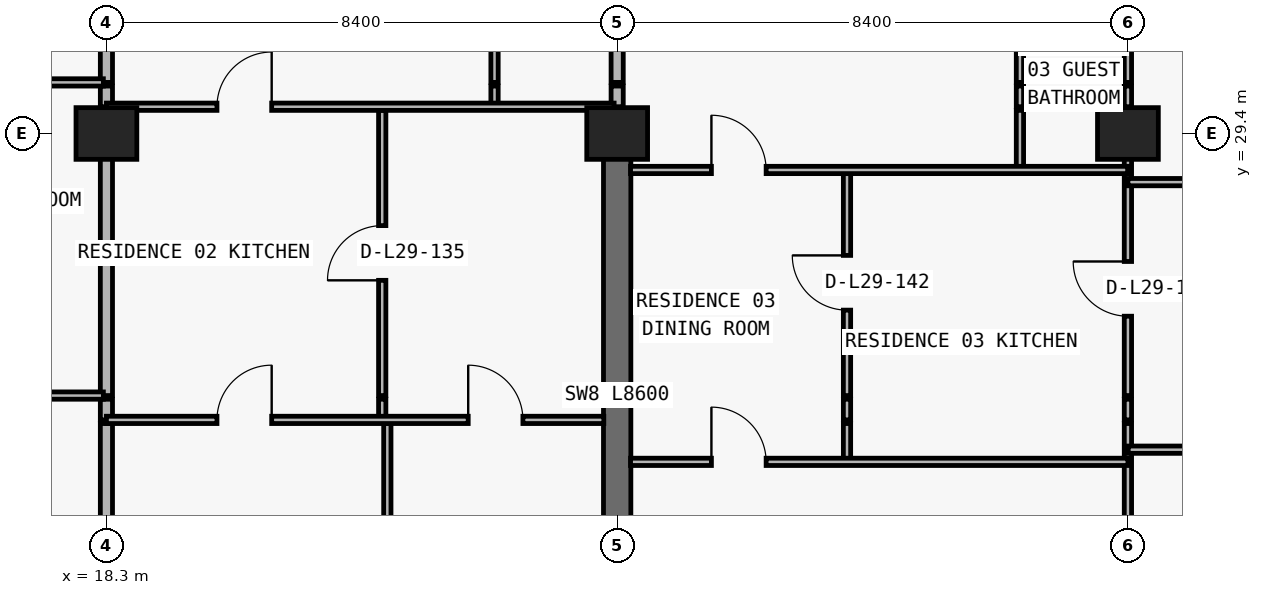
"""IFC4 building model, lengths in metres.
Left out: names, types, materials, properties, quantities, classifications, styles, units other than length and angle.
Written with IfcOpenShell. Run it as: python <this file> out.ifc"""

import sys

from ifc_helpers import new_model, si_unit, direction, frame, frame_2d, origin, origin_2d, place, context, subcontext, project, spatial, rectangle, extrude, element, fill, save


model = new_model("IFC4")
c1 = context("Model", 3, precision=1e-05, world=origin(), true_north=direction((0.0, 1.0)))
c2 = subcontext(c1, "Body", "Model", "MODEL_VIEW")
j1 = project(units=[si_unit("LENGTHUNIT", "METRE"), si_unit("PLANEANGLEUNIT", "RADIAN")], contexts=[c1])
p1 = place(None, origin())
s1 = spatial("IfcSite", under=j1, at=p1, CompositionType="ELEMENT")
p2 = place(p1, origin())
s2 = spatial("IfcBuilding", under=s1, at=p2, CompositionType="ELEMENT")
p3 = place(p2, frame((0.0, 0.0, 109.2)))
s3 = spatial("IfcBuildingStorey", under=s2, at=p3, CompositionType="ELEMENT", Elevation=109.2)
for number, where, z_axis, x_axis in (
    (1, (18.3, 29.4, 0.0), (0.0, 0.0, 1.0), (1.0, 0.0, 0.0)),
    (2, (26.7, 29.4, 0.0), (0.0, 0.0, 1.0), (1.0, 0.0, 0.0)),
    (3, (35.1, 29.4, 0.0), (0.0, 0.0, 1.0), (1.0, 0.0, 0.0)),
):
    element("IfcColumn", number, at=place(p3, frame(where, z_axis=z_axis, x_axis=x_axis)), inside=s3, PredefinedType="COLUMN", context=c2, shape_type="SweptSolid", body=[
        extrude(rectangle(XDim=1.0, YDim=0.85, at=origin_2d()), origin(), (0.0, 0.0, 1.0), 3.05),
    ])
p4 = place(p3, frame((26.7, 20.8, 0.0), z_axis=(0.0, 0.0, 1.0), x_axis=(0.0, 1.0, 0.0)))
e4 = element("IfcWall", 4, at=p4, inside=s3, PredefinedType="SHEAR", context=c2, shape_type="SweptSolid", body=[
    extrude(rectangle(XDim=8.6, YDim=0.45, at=frame_2d((4.3, 0.0))), origin(), (0.0, 0.0, 1.0), 3.05),
])
p5 = place(p3, frame((18.3, 8.84, 0.0), z_axis=(0.0, 0.0, 1.0), x_axis=(0.0, 1.0, 0.0)))
e5 = element("IfcWall", 5, at=p5, inside=s3, PredefinedType="PARTITIONING", context=c2, shape_type="SweptSolid", body=[
    extrude(rectangle(XDim=15.79, YDim=0.2, at=frame_2d((7.895, 0.0))), origin(), (0.0, 0.0, 1.0), 2.174),
])
p6 = place(p3, frame((18.3, 24.69, 0.0), z_axis=(0.0, 0.0, 1.0), x_axis=(0.0, 1.0, 0.0)))
e6 = element("IfcWall", 6, at=p6, inside=s3, PredefinedType="PARTITIONING", context=c2, shape_type="SweptSolid", body=[
    extrude(rectangle(XDim=0.34, YDim=0.2, at=frame_2d((0.17, 0.0))), origin(), (0.0, 0.0, 1.0), 2.174),
])
p7 = place(p3, frame((18.3, 25.09, 0.0), z_axis=(0.0, 0.0, 1.0), x_axis=(0.0, 1.0, 0.0)))
e7 = element("IfcWall", 7, at=p7, inside=s3, PredefinedType="PARTITIONING", context=c2, shape_type="SweptSolid", body=[
    extrude(rectangle(XDim=4.69, YDim=0.2, at=frame_2d((2.345, 0.0))), origin(), (0.0, 0.0, 1.0), 2.174),
])
p8 = place(p3, frame((18.3, 29.84, 0.0), z_axis=(0.0, 0.0, 1.0), x_axis=(0.0, 1.0, 0.0)))
e8 = element("IfcWall", 8, at=p8, inside=s3, PredefinedType="PARTITIONING", context=c2, shape_type="SweptSolid", body=[
    extrude(rectangle(XDim=0.34, YDim=0.2, at=frame_2d((0.17, 0.0))), origin(), (0.0, 0.0, 1.0), 2.174),
])
p9 = place(p3, frame((18.3, 30.24, 0.0), z_axis=(0.0, 0.0, 1.0), x_axis=(0.0, 1.0, 0.0)))
e9 = element("IfcWall", 9, at=p9, inside=s3, PredefinedType="PARTITIONING", context=c2, shape_type="SweptSolid", body=[
    extrude(rectangle(XDim=4.36, YDim=0.2, at=frame_2d((2.18, 0.0))), origin(), (0.0, 0.0, 1.0), 2.174),
])
p10 = place(p3, frame((22.836, 24.69, 0.0), z_axis=(0.0, 0.0, 1.0), x_axis=(0.0, 1.0, 0.0)))
e10 = element("IfcWall", 10, at=p10, inside=s3, PredefinedType="PARTITIONING", context=c2, shape_type="SweptSolid", body=[
    extrude(rectangle(XDim=0.34, YDim=0.12, at=frame_2d((0.17, 0.0))), origin(), (0.0, 0.0, 1.0), 3.05),
])
p11 = place(p3, frame((22.836, 25.09, 0.0), z_axis=(0.0, 0.0, 1.0), x_axis=(0.0, 1.0, 0.0)))
e11 = element("IfcWall", 11, at=p11, inside=s3, PredefinedType="PARTITIONING", context=c2, shape_type="SweptSolid", body=[
    extrude(rectangle(XDim=4.69, YDim=0.12, at=frame_2d((2.345, 0.0))), origin(), (0.0, 0.0, 1.0), 3.05),
])
p12 = place(p11, frame((1.895, 0.0, 0.0)))
e12 = element("IfcOpeningElement", 12, at=p12, cuts=e11, PredefinedType="OPENING", context=c2, shape_type="SweptSolid", body=[
    extrude(rectangle(XDim=0.9, YDim=2.15, at=frame_2d((0.45, 1.075))), frame((0.0, 0.07, 0.0), z_axis=(0.0, -1.0, 0.0), x_axis=(1.0, 0.0, 0.0)), (0.0, 0.0, 1.0), 0.14),
])
p13 = place(p3, frame((22.92, 8.84, 0.0), z_axis=(0.0, 0.0, 1.0), x_axis=(0.0, 1.0, 0.0)))
e13 = element("IfcWall", 13, at=p13, inside=s3, PredefinedType="PARTITIONING", context=c2, shape_type="SweptSolid", body=[
    extrude(rectangle(XDim=15.79, YDim=0.12, at=frame_2d((7.895, 0.0))), origin(), (0.0, 0.0, 1.0), 3.05),
])
p14 = place(p3, frame((24.683, 29.84, 0.0), z_axis=(0.0, 0.0, 1.0), x_axis=(0.0, 1.0, 0.0)))
e14 = element("IfcWall", 14, at=p14, inside=s3, PredefinedType="PARTITIONING", context=c2, shape_type="SweptSolid", body=[
    extrude(rectangle(XDim=0.34, YDim=0.12, at=frame_2d((0.17, 0.0))), origin(), (0.0, 0.0, 1.0), 3.05),
])
p15 = place(p3, frame((24.683, 30.24, 0.0), z_axis=(0.0, 0.0, 1.0), x_axis=(0.0, 1.0, 0.0)))
e15 = element("IfcWall", 15, at=p15, inside=s3, PredefinedType="PARTITIONING", context=c2, shape_type="SweptSolid", body=[
    extrude(rectangle(XDim=4.36, YDim=0.12, at=frame_2d((2.18, 0.0))), origin(), (0.0, 0.0, 1.0), 3.05),
])
p16 = place(p15, frame((1.755, 0.0, 0.0)))
e16 = element("IfcOpeningElement", 16, at=p16, cuts=e15, PredefinedType="OPENING", context=c2, shape_type="SweptSolid", body=[
    extrude(rectangle(XDim=0.85, YDim=2.1, at=frame_2d((0.425, 1.05))), frame((0.0, 0.07, 0.0), z_axis=(0.0, -1.0, 0.0), x_axis=(1.0, 0.0, 0.0)), (0.0, 0.0, 1.0), 0.14),
])
p17 = place(p3, frame((26.7, 29.405, 0.0), z_axis=(0.0, 0.0, 1.0), x_axis=(0.0, 1.0, 0.0)))
e17 = element("IfcWall", 17, at=p17, inside=s3, PredefinedType="PARTITIONING", context=c2, shape_type="SweptSolid", body=[
    extrude(rectangle(XDim=0.375, YDim=0.2, at=frame_2d((0.188, 0.0))), origin(), (0.0, 0.0, 1.0), 3.05),
])
p18 = place(p3, frame((26.7, 29.84, 0.0), z_axis=(0.0, 0.0, 1.0), x_axis=(0.0, 1.0, 0.0)))
e18 = element("IfcWall", 18, at=p18, inside=s3, PredefinedType="PARTITIONING", context=c2, shape_type="SweptSolid", body=[
    extrude(rectangle(XDim=0.34, YDim=0.2, at=frame_2d((0.17, 0.0))), origin(), (0.0, 0.0, 1.0), 2.335),
])
p19 = place(p3, frame((26.7, 30.24, 0.0), z_axis=(0.0, 0.0, 1.0), x_axis=(0.0, 1.0, 0.0)))
e19 = element("IfcWall", 19, at=p19, inside=s3, PredefinedType="PARTITIONING", context=c2, shape_type="SweptSolid", body=[
    extrude(rectangle(XDim=4.36, YDim=0.2, at=frame_2d((2.18, 0.0))), origin(), (0.0, 0.0, 1.0), 2.335),
])
p20 = place(p3, frame((30.48, 24.0, 0.0), z_axis=(0.0, 0.0, 1.0), x_axis=(0.0, 1.0, 0.0)))
e20 = element("IfcWall", 20, at=p20, inside=s3, PredefinedType="PARTITIONING", context=c2, shape_type="SweptSolid", body=[
    extrude(rectangle(XDim=0.63, YDim=0.12, at=frame_2d((0.315, 0.0))), origin(), (0.0, 0.0, 1.0), 3.05),
])
p21 = place(p3, frame((30.48, 24.69, 0.0), z_axis=(0.0, 0.0, 1.0), x_axis=(0.0, 1.0, 0.0)))
e21 = element("IfcWall", 21, at=p21, inside=s3, PredefinedType="PARTITIONING", context=c2, shape_type="SweptSolid", body=[
    extrude(rectangle(XDim=0.34, YDim=0.12, at=frame_2d((0.17, 0.0))), origin(), (0.0, 0.0, 1.0), 3.05),
])
p22 = place(p3, frame((30.48, 25.09, 0.0), z_axis=(0.0, 0.0, 1.0), x_axis=(0.0, 1.0, 0.0)))
e22 = element("IfcWall", 22, at=p22, inside=s3, PredefinedType="PARTITIONING", context=c2, shape_type="SweptSolid", body=[
    extrude(rectangle(XDim=3.71, YDim=0.12, at=frame_2d((1.855, 0.0))), origin(), (0.0, 0.0, 1.0), 3.05),
])
p23 = place(p22, frame((1.405, 0.0, 0.0)))
e23 = element("IfcOpeningElement", 23, at=p23, cuts=e22, PredefinedType="OPENING", context=c2, shape_type="SweptSolid", body=[
    extrude(rectangle(XDim=0.9, YDim=2.15, at=frame_2d((0.45, 1.075))), frame((0.0, 0.07, 0.0), z_axis=(0.0, -1.0, 0.0), x_axis=(1.0, 0.0, 0.0)), (0.0, 0.0, 1.0), 0.14),
])
p24 = place(p3, frame((33.324, 28.8, 0.0), z_axis=(0.0, 0.0, 1.0), x_axis=(0.0, 1.0, 0.0)))
e24 = element("IfcWall", 24, at=p24, inside=s3, PredefinedType="PARTITIONING", context=c2, shape_type="SweptSolid", body=[
    extrude(rectangle(XDim=0.98, YDim=0.12, at=frame_2d((0.49, 0.0))), origin(), (0.0, 0.0, 1.0), 3.05),
])
p25 = place(p3, frame((33.324, 29.84, 0.0), z_axis=(0.0, 0.0, 1.0), x_axis=(0.0, 1.0, 0.0)))
e25 = element("IfcWall", 25, at=p25, inside=s3, PredefinedType="PARTITIONING", context=c2, shape_type="SweptSolid", body=[
    extrude(rectangle(XDim=0.34, YDim=0.12, at=frame_2d((0.17, 0.0))), origin(), (0.0, 0.0, 1.0), 3.05),
])
p26 = place(p3, frame((33.324, 30.24, 0.0), z_axis=(0.0, 0.0, 1.0), x_axis=(0.0, 1.0, 0.0)))
e26 = element("IfcWall", 26, at=p26, inside=s3, PredefinedType="PARTITIONING", context=c2, shape_type="SweptSolid", body=[
    extrude(rectangle(XDim=4.36, YDim=0.12, at=frame_2d((2.18, 0.0))), origin(), (0.0, 0.0, 1.0), 3.05),
])
p27 = place(p26, frame((1.755, 0.0, 0.0)))
e27 = element("IfcOpeningElement", 27, at=p27, cuts=e26, PredefinedType="OPENING", context=c2, shape_type="SweptSolid", body=[
    extrude(rectangle(XDim=0.85, YDim=2.1, at=frame_2d((0.425, 1.05))), frame((0.0, 0.07, 0.0), z_axis=(0.0, -1.0, 0.0), x_axis=(1.0, 0.0, 0.0)), (0.0, 0.0, 1.0), 0.14),
])
p28 = place(p3, frame((35.1, 8.84, 0.0), z_axis=(0.0, 0.0, 1.0), x_axis=(0.0, 1.0, 0.0)))
e28 = element("IfcWall", 28, at=p28, inside=s3, PredefinedType="PARTITIONING", context=c2, shape_type="SweptSolid", body=[
    extrude(rectangle(XDim=15.79, YDim=0.12, at=frame_2d((7.895, 0.0))), origin(), (0.0, 0.0, 1.0), 2.174),
])
p29 = place(p3, frame((35.1, 24.69, 0.0), z_axis=(0.0, 0.0, 1.0), x_axis=(0.0, 1.0, 0.0)))
e29 = element("IfcWall", 29, at=p29, inside=s3, PredefinedType="PARTITIONING", context=c2, shape_type="SweptSolid", body=[
    extrude(rectangle(XDim=0.34, YDim=0.12, at=frame_2d((0.17, 0.0))), origin(), (0.0, 0.0, 1.0), 2.174),
])
p30 = place(p3, frame((35.1, 25.09, 0.0), z_axis=(0.0, 0.0, 1.0), x_axis=(0.0, 1.0, 0.0)))
e30 = element("IfcWall", 30, at=p30, inside=s3, PredefinedType="PARTITIONING", context=c2, shape_type="SweptSolid", body=[
    extrude(rectangle(XDim=4.69, YDim=0.12, at=frame_2d((2.345, 0.0))), origin(), (0.0, 0.0, 1.0), 2.174),
])
p31 = place(p30, frame((1.305, 0.0, 0.0)))
e31 = element("IfcOpeningElement", 31, at=p31, cuts=e30, PredefinedType="OPENING", context=c2, shape_type="SweptSolid", body=[
    extrude(rectangle(XDim=0.9, YDim=2.124, at=frame_2d((0.45, 1.062))), frame((0.0, 0.07, 0.0), z_axis=(0.0, -1.0, 0.0), x_axis=(1.0, 0.0, 0.0)), (0.0, 0.0, 1.0), 0.14),
])
p32 = place(p3, frame((35.1, 29.84, 0.0), z_axis=(0.0, 0.0, 1.0), x_axis=(0.0, 1.0, 0.0)))
e32 = element("IfcWall", 32, at=p32, inside=s3, PredefinedType="PARTITIONING", context=c2, shape_type="SweptSolid", body=[
    extrude(rectangle(XDim=0.34, YDim=0.12, at=frame_2d((0.17, 0.0))), origin(), (0.0, 0.0, 1.0), 2.174),
])
p33 = place(p3, frame((35.1, 30.24, 0.0), z_axis=(0.0, 0.0, 1.0), x_axis=(0.0, 1.0, 0.0)))
e33 = element("IfcWall", 33, at=p33, inside=s3, PredefinedType="PARTITIONING", context=c2, shape_type="SweptSolid", body=[
    extrude(rectangle(XDim=4.36, YDim=0.12, at=frame_2d((2.18, 0.0))), origin(), (0.0, 0.0, 1.0), 2.174),
])
p34 = place(p3, frame((26.92, 24.0, 0.0), z_axis=(0.0, 0.0, 1.0), x_axis=(1.0, 0.0, 0.0)))
e34 = element("IfcWall", 34, at=p34, inside=s3, PredefinedType="PARTITIONING", context=c2, shape_type="SweptSolid", body=[
    extrude(rectangle(XDim=8.18, YDim=0.12, at=frame_2d((4.09, 0.0))), origin(), (0.0, 0.0, 1.0), 3.05),
])
p35 = place(p34, frame((1.33, 0.0, 0.0)))
e35 = element("IfcOpeningElement", 35, at=p35, cuts=e34, PredefinedType="OPENING", context=c2, shape_type="SweptSolid", body=[
    extrude(rectangle(XDim=0.9, YDim=2.15, at=frame_2d((0.45, 1.075))), frame((0.0, 0.07, 0.0), z_axis=(0.0, -1.0, 0.0), x_axis=(1.0, 0.0, 0.0)), (0.0, 0.0, 1.0), 0.14),
])
p36 = place(p3, frame((35.105, 24.2, 0.0), z_axis=(0.0, 0.0, 1.0), x_axis=(1.0, 0.0, 0.0)))
e36 = element("IfcWall", 36, at=p36, inside=s3, PredefinedType="PARTITIONING", context=c2, shape_type="SweptSolid", body=[
    extrude(rectangle(XDim=7.59, YDim=0.12, at=frame_2d((3.795, 0.0))), origin(), (0.0, 0.0, 1.0), 3.05),
])
p37 = place(p36, frame((3.345, 0.0, 0.0)))
e37 = element("IfcOpeningElement", 37, at=p37, cuts=e36, PredefinedType="OPENING", context=c2, shape_type="SweptSolid", body=[
    extrude(rectangle(XDim=0.9, YDim=2.15, at=frame_2d((0.45, 1.075))), frame((0.0, 0.07, 0.0), z_axis=(0.0, -1.0, 0.0), x_axis=(1.0, 0.0, 0.0)), (0.0, 0.0, 1.0), 0.14),
])
p38 = place(p3, frame((18.3, 24.69, 0.0), z_axis=(0.0, 0.0, 1.0), x_axis=(1.0, 0.0, 0.0)))
e38 = element("IfcWall", 38, at=p38, inside=s3, PredefinedType="PARTITIONING", context=c2, shape_type="SweptSolid", body=[
    extrude(rectangle(XDim=8.18, YDim=0.12, at=frame_2d((4.09, 0.0))), origin(), (0.0, 0.0, 1.0), 3.05),
])
p39 = place(p38, frame((1.818, 0.0, 0.0)))
e39 = element("IfcOpeningElement", 39, at=p39, cuts=e38, PredefinedType="OPENING", context=c2, shape_type="SweptSolid", body=[
    extrude(rectangle(XDim=0.9, YDim=2.15, at=frame_2d((0.45, 1.075))), frame((0.0, 0.07, 0.0), z_axis=(0.0, -1.0, 0.0), x_axis=(1.0, 0.0, 0.0)), (0.0, 0.0, 1.0), 0.14),
])
p40 = place(p38, frame((5.95, 0.0, 0.0)))
e40 = element("IfcOpeningElement", 40, at=p40, cuts=e38, PredefinedType="OPENING", context=c2, shape_type="SweptSolid", body=[
    extrude(rectangle(XDim=0.9, YDim=2.15, at=frame_2d((0.45, 1.075))), frame((0.0, 0.07, 0.0), z_axis=(0.0, -1.0, 0.0), x_axis=(1.0, 0.0, 0.0)), (0.0, 0.0, 1.0), 0.14),
])
p41 = place(p3, frame((9.9, 25.09, 0.0), z_axis=(0.0, 0.0, 1.0), x_axis=(1.0, 0.0, 0.0)))
e41 = element("IfcWall", 41, at=p41, inside=s3, PredefinedType="PARTITIONING", context=c2, shape_type="SweptSolid", body=[
    extrude(rectangle(XDim=8.35, YDim=0.12, at=frame_2d((4.175, 0.0))), origin(), (0.0, 0.0, 1.0), 3.05),
])
p42 = place(p41, frame((1.524, 0.0, 0.0)))
e42 = element("IfcOpeningElement", 42, at=p42, cuts=e41, PredefinedType="OPENING", context=c2, shape_type="SweptSolid", body=[
    extrude(rectangle(XDim=0.9, YDim=2.15, at=frame_2d((0.45, 1.075))), frame((0.0, 0.07, 0.0), z_axis=(0.0, -1.0, 0.0), x_axis=(1.0, 0.0, 0.0)), (0.0, 0.0, 1.0), 0.14),
])
p43 = place(p41, frame((5.868, 0.0, 0.0)))
e43 = element("IfcOpeningElement", 43, at=p43, cuts=e41, PredefinedType="OPENING", context=c2, shape_type="SweptSolid", body=[
    extrude(rectangle(XDim=0.9, YDim=2.15, at=frame_2d((0.45, 1.075))), frame((0.0, 0.07, 0.0), z_axis=(0.0, -1.0, 0.0), x_axis=(1.0, 0.0, 0.0)), (0.0, 0.0, 1.0), 0.14),
])
p44 = place(p3, frame((35.1, 28.6, 0.0), z_axis=(0.0, 0.0, 1.0), x_axis=(1.0, 0.0, 0.0)))
e44 = element("IfcWall", 44, at=p44, inside=s3, PredefinedType="PARTITIONING", context=c2, shape_type="SweptSolid", body=[
    extrude(rectangle(XDim=7.6, YDim=0.12, at=frame_2d((3.8, 0.0))), origin(), (0.0, 0.0, 1.0), 3.05),
])
p45 = place(p44, frame((2.55, 0.0, 0.0)))
e45 = element("IfcOpeningElement", 45, at=p45, cuts=e44, PredefinedType="OPENING", context=c2, shape_type="SweptSolid", body=[
    extrude(rectangle(XDim=0.9, YDim=2.15, at=frame_2d((0.45, 1.075))), frame((0.0, 0.07, 0.0), z_axis=(0.0, -1.0, 0.0), x_axis=(1.0, 0.0, 0.0)), (0.0, 0.0, 1.0), 0.14),
])
p46 = place(p3, frame((26.92, 28.8, 0.0), z_axis=(0.0, 0.0, 1.0), x_axis=(1.0, 0.0, 0.0)))
e46 = element("IfcWall", 46, at=p46, inside=s3, PredefinedType="PARTITIONING", context=c2, shape_type="SweptSolid", body=[
    extrude(rectangle(XDim=8.175, YDim=0.12, at=frame_2d((4.087, 0.0))), origin(), (0.0, 0.0, 1.0), 3.05),
])
p47 = place(p46, frame((1.33, 0.0, 0.0)))
e47 = element("IfcOpeningElement", 47, at=p47, cuts=e46, PredefinedType="OPENING", context=c2, shape_type="SweptSolid", body=[
    extrude(rectangle(XDim=0.9, YDim=2.15, at=frame_2d((0.45, 1.075))), frame((0.0, 0.07, 0.0), z_axis=(0.0, -1.0, 0.0), x_axis=(1.0, 0.0, 0.0)), (0.0, 0.0, 1.0), 0.14),
])
p48 = place(p3, frame((18.3, 29.84, 0.0), z_axis=(0.0, 0.0, 1.0), x_axis=(1.0, 0.0, 0.0)))
e48 = element("IfcWall", 48, at=p48, inside=s3, PredefinedType="PARTITIONING", context=c2, shape_type="SweptSolid", body=[
    extrude(rectangle(XDim=8.35, YDim=0.12, at=frame_2d((4.175, 0.0))), origin(), (0.0, 0.0, 1.0), 3.05),
])
p49 = place(p48, frame((1.818, 0.0, 0.0)))
e49 = element("IfcOpeningElement", 49, at=p49, cuts=e48, PredefinedType="OPENING", context=c2, shape_type="SweptSolid", body=[
    extrude(rectangle(XDim=0.9, YDim=2.15, at=frame_2d((0.45, 1.075))), frame((0.0, 0.07, 0.0), z_axis=(0.0, -1.0, 0.0), x_axis=(1.0, 0.0, 0.0)), (0.0, 0.0, 1.0), 0.14),
])
p50 = place(p3, frame((9.9, 30.24, 0.0), z_axis=(0.0, 0.0, 1.0), x_axis=(1.0, 0.0, 0.0)))
e50 = element("IfcWall", 50, at=p50, inside=s3, PredefinedType="PARTITIONING", context=c2, shape_type="SweptSolid", body=[
    extrude(rectangle(XDim=8.35, YDim=0.12, at=frame_2d((4.175, 0.0))), origin(), (0.0, 0.0, 1.0), 3.05),
])
p51 = place(p50, frame((1.693, 0.0, 0.0)))
e51 = element("IfcOpeningElement", 51, at=p51, cuts=e50, PredefinedType="OPENING", context=c2, shape_type="SweptSolid", body=[
    extrude(rectangle(XDim=0.9, YDim=2.15, at=frame_2d((0.45, 1.075))), frame((0.0, 0.07, 0.0), z_axis=(0.0, -1.0, 0.0), x_axis=(1.0, 0.0, 0.0)), (0.0, 0.0, 1.0), 0.14),
])
p52 = place(p49, origin())
e52 = element("IfcDoor", 52, at=p52, inside=s3, OperationType="SINGLE_SWING_RIGHT", PredefinedType="DOOR", context=c2, shape_type="SweptSolid", body=[
    extrude(rectangle(XDim=0.9, YDim=2.15, at=frame_2d((0.45, 1.075))), frame((0.0, 0.025, 0.0), z_axis=(0.0, -1.0, 0.0), x_axis=(1.0, 0.0, 0.0)), (0.0, 0.0, 1.0), 0.05),
])
fill(e49, e52)
p53 = place(p12, origin())
e53 = element("IfcDoor", 53, at=p53, inside=s3, OperationType="SINGLE_SWING_LEFT", PredefinedType="DOOR", context=c2, shape_type="SweptSolid", body=[
    extrude(rectangle(XDim=0.9, YDim=2.15, at=frame_2d((0.45, 1.075))), frame((0.0, 0.025, 0.0), z_axis=(0.0, -1.0, 0.0), x_axis=(1.0, 0.0, 0.0)), (0.0, 0.0, 1.0), 0.05),
])
fill(e12, e53)
p54 = place(p39, origin())
e54 = element("IfcDoor", 54, at=p54, inside=s3, OperationType="SINGLE_SWING_RIGHT", PredefinedType="DOOR", context=c2, shape_type="SweptSolid", body=[
    extrude(rectangle(XDim=0.9, YDim=2.15, at=frame_2d((0.45, 1.075))), frame((0.0, 0.025, 0.0), z_axis=(0.0, -1.0, 0.0), x_axis=(1.0, 0.0, 0.0)), (0.0, 0.0, 1.0), 0.05),
])
fill(e39, e54)
p55 = place(p40, origin())
e55 = element("IfcDoor", 55, at=p55, inside=s3, OperationType="SINGLE_SWING_LEFT", PredefinedType="DOOR", context=c2, shape_type="SweptSolid", body=[
    extrude(rectangle(XDim=0.9, YDim=2.15, at=frame_2d((0.45, 1.075))), frame((0.0, 0.025, 0.0), z_axis=(0.0, -1.0, 0.0), x_axis=(1.0, 0.0, 0.0)), (0.0, 0.0, 1.0), 0.05),
])
fill(e40, e55)
p56 = place(p47, origin())
e56 = element("IfcDoor", 56, at=p56, inside=s3, OperationType="SINGLE_SWING_LEFT", PredefinedType="DOOR", context=c2, shape_type="SweptSolid", body=[
    extrude(rectangle(XDim=0.9, YDim=2.15, at=frame_2d((0.45, 1.075))), frame((0.0, 0.025, 0.0), z_axis=(0.0, -1.0, 0.0), x_axis=(1.0, 0.0, 0.0)), (0.0, 0.0, 1.0), 0.05),
])
fill(e47, e56)
p57 = place(p23, origin())
e57 = element("IfcDoor", 57, at=p57, inside=s3, OperationType="SINGLE_SWING_RIGHT", PredefinedType="DOOR", context=c2, shape_type="SweptSolid", body=[
    extrude(rectangle(XDim=0.9, YDim=2.15, at=frame_2d((0.45, 1.075))), frame((0.0, 0.025, 0.0), z_axis=(0.0, -1.0, 0.0), x_axis=(1.0, 0.0, 0.0)), (0.0, 0.0, 1.0), 0.05),
])
fill(e23, e57)
p58 = place(p35, origin())
e58 = element("IfcDoor", 58, at=p58, inside=s3, OperationType="SINGLE_SWING_LEFT", PredefinedType="DOOR", context=c2, shape_type="SweptSolid", body=[
    extrude(rectangle(XDim=0.9, YDim=2.15, at=frame_2d((0.45, 1.075))), frame((0.0, 0.025, 0.0), z_axis=(0.0, -1.0, 0.0), x_axis=(1.0, 0.0, 0.0)), (0.0, 0.0, 1.0), 0.05),
])
fill(e35, e58)
p59 = place(p31, origin())
e59 = element("IfcDoor", 59, at=p59, inside=s3, OperationType="SINGLE_SWING_RIGHT", PredefinedType="DOOR", context=c2, shape_type="SweptSolid", body=[
    extrude(rectangle(XDim=0.9, YDim=2.124, at=frame_2d((0.45, 1.062))), frame((0.0, 0.025, 0.0), z_axis=(0.0, -1.0, 0.0), x_axis=(1.0, 0.0, 0.0)), (0.0, 0.0, 1.0), 0.05),
])
fill(e31, e59)
save(model, sys.argv[1])
